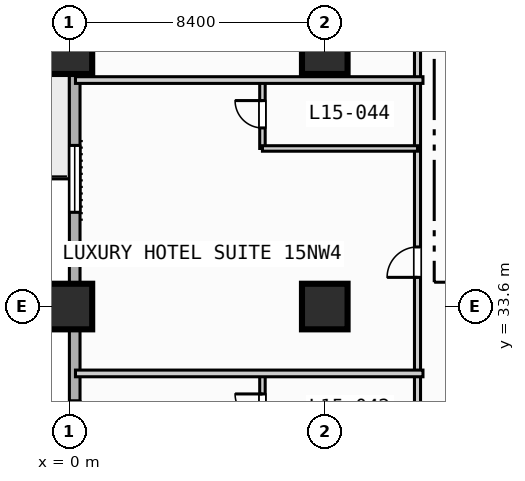
"""IFC4 building model, lengths in metres.
Left out: names, types, materials, properties, quantities, classifications, styles, units other than length and angle.
Written with IfcOpenShell. Run it as: python <this file> out.ifc"""

import sys

from ifc_helpers import new_model, si_unit, direction, frame, frame_2d, origin, origin_2d, place, context, subcontext, project, spatial, rectangle, extrude, element, fill, save


model = new_model("IFC4")
c1 = context("Model", 3, precision=1e-05, world=origin(), true_north=direction((0.0, 1.0)))
c2 = subcontext(c1, "Body", "Model", "MODEL_VIEW")
j1 = project(units=[si_unit("LENGTHUNIT", "METRE"), si_unit("PLANEANGLEUNIT", "RADIAN")], contexts=[c1])
p1 = place(None, origin())
s1 = spatial("IfcSite", under=j1, at=p1, CompositionType="ELEMENT")
p2 = place(p1, origin())
s2 = spatial("IfcBuilding", under=s1, at=p2, CompositionType="ELEMENT")
p3 = place(p2, frame((0.0, 0.0, 66.2)))
s3 = spatial("IfcBuildingStorey", under=s2, at=p3, CompositionType="ELEMENT", Elevation=66.2)
for number, where, z_axis, x_axis in (
    (1, (0.0, 33.6, 0.0), (0.0, 0.0, 1.0), (1.0, 0.0, 0.0)),
    (2, (0.0, 42.0, 0.0), (0.0, 0.0, 1.0), (1.0, 0.0, 0.0)),
    (3, (8.4, 33.6, 0.0), (0.0, 0.0, 1.0), (1.0, 0.0, 0.0)),
    (4, (8.4, 42.0, 0.0), (0.0, 0.0, 1.0), (1.0, 0.0, 0.0)),
):
    element("IfcColumn", number, at=place(p3, frame(where, z_axis=z_axis, x_axis=x_axis)), inside=s3, PredefinedType="COLUMN", context=c2, shape_type="SweptSolid", body=[
        extrude(rectangle(XDim=1.5, YDim=1.5, at=origin_2d()), origin(), (0.0, 0.0, 1.0), 3.8),
    ])
p4 = place(p3, frame((0.175, 3.175, 0.0), z_axis=(0.0, 0.0, 1.0), x_axis=(0.0, 1.0, 0.0)))
e5 = element("IfcWall", 5, at=p4, inside=s3, PredefinedType="STANDARD", context=c2, shape_type="SweptSolid", body=[
    extrude(rectangle(XDim=86.05, YDim=0.35, at=frame_2d((43.025, 0.0))), origin(), (0.0, 0.0, 1.0), 3.55),
])
p5 = place(p4, frame((42.325, 0.0, 0.0)))
e6 = element("IfcOpeningElement", 6, at=p5, cuts=e5, PredefinedType="OPENING", context=c2, shape_type="SweptSolid", body=[
    extrude(rectangle(XDim=1.4, YDim=2.2, at=frame_2d((0.7, 1.1))), frame((0.0, 0.185, 0.0), z_axis=(0.0, -1.0, 0.0), x_axis=(1.0, 0.0, 0.0)), (0.0, 0.0, 1.0), 0.37),
])
p6 = place(p4, frame((8.325, 0.0, 0.85)))
e7 = element("IfcOpeningElement", 7, at=p6, cuts=e5, PredefinedType="OPENING", context=c2, shape_type="SweptSolid", body=[
    extrude(rectangle(XDim=2.2, YDim=1.8, at=frame_2d((1.1, 0.9))), frame((0.0, 0.185, 0.0), z_axis=(0.0, -1.0, 0.0), x_axis=(1.0, 0.0, 0.0)), (0.0, 0.0, 1.0), 0.37),
])
p7 = place(p4, frame((16.725, 0.0, 0.85)))
e8 = element("IfcOpeningElement", 8, at=p7, cuts=e5, PredefinedType="OPENING", context=c2, shape_type="SweptSolid", body=[
    extrude(rectangle(XDim=2.2, YDim=1.8, at=frame_2d((1.1, 0.9))), frame((0.0, 0.185, 0.0), z_axis=(0.0, -1.0, 0.0), x_axis=(1.0, 0.0, 0.0)), (0.0, 0.0, 1.0), 0.37),
])
p8 = place(p4, frame((25.125, 0.0, 0.85)))
e9 = element("IfcOpeningElement", 9, at=p8, cuts=e5, PredefinedType="OPENING", context=c2, shape_type="SweptSolid", body=[
    extrude(rectangle(XDim=2.2, YDim=1.8, at=frame_2d((1.1, 0.9))), frame((0.0, 0.185, 0.0), z_axis=(0.0, -1.0, 0.0), x_axis=(1.0, 0.0, 0.0)), (0.0, 0.0, 1.0), 0.37),
])
p9 = place(p4, frame((33.525, 0.0, 0.85)))
e10 = element("IfcOpeningElement", 10, at=p9, cuts=e5, PredefinedType="OPENING", context=c2, shape_type="SweptSolid", body=[
    extrude(rectangle(XDim=2.2, YDim=1.8, at=frame_2d((1.1, 0.9))), frame((0.0, 0.185, 0.0), z_axis=(0.0, -1.0, 0.0), x_axis=(1.0, 0.0, 0.0)), (0.0, 0.0, 1.0), 0.37),
])
p10 = place(p4, frame((2.375, 0.0, 0.85)))
e11 = element("IfcOpeningElement", 11, at=p10, cuts=e5, PredefinedType="OPENING", context=c2, shape_type="SweptSolid", body=[
    extrude(rectangle(XDim=1.8, YDim=1.8, at=frame_2d((0.9, 0.9))), frame((0.0, 0.185, 0.0), z_axis=(0.0, -1.0, 0.0), x_axis=(1.0, 0.0, 0.0)), (0.0, 0.0, 1.0), 0.37),
])
p11 = place(p4, frame((56.475, 0.0, 0.85)))
e12 = element("IfcOpeningElement", 12, at=p11, cuts=e5, PredefinedType="OPENING", context=c2, shape_type="SweptSolid", body=[
    extrude(rectangle(XDim=1.8, YDim=1.8, at=frame_2d((0.9, 0.9))), frame((0.0, 0.185, 0.0), z_axis=(0.0, -1.0, 0.0), x_axis=(1.0, 0.0, 0.0)), (0.0, 0.0, 1.0), 0.37),
])
p12 = place(p3, frame((11.45, 3.4, 0.0), z_axis=(0.0, 0.0, 1.0), x_axis=(0.0, 1.0, 0.0)))
e13 = element("IfcWall", 13, at=p12, inside=s3, PredefinedType="PARTITIONING", context=c2, shape_type="SweptSolid", body=[
    extrude(rectangle(XDim=60.4, YDim=0.2, at=frame_2d((30.2, 0.0))), origin(), (0.0, 0.0, 1.0), 3.55),
])
p13 = place(p12, frame((4.465, 0.0, 0.0)))
e14 = element("IfcOpeningElement", 14, at=p13, cuts=e13, PredefinedType="OPENING", context=c2, shape_type="SweptSolid", body=[
    extrude(rectangle(XDim=1.0, YDim=2.15, at=frame_2d((0.5, 1.075))), frame((0.0, 0.11, 0.0), z_axis=(0.0, -1.0, 0.0), x_axis=(1.0, 0.0, 0.0)), (0.0, 0.0, 1.0), 0.22),
])
p14 = place(p12, frame((14.665, 0.0, 0.0)))
e15 = element("IfcOpeningElement", 15, at=p14, cuts=e13, PredefinedType="OPENING", context=c2, shape_type="SweptSolid", body=[
    extrude(rectangle(XDim=1.0, YDim=2.15, at=frame_2d((0.5, 1.075))), frame((0.0, 0.11, 0.0), z_axis=(0.0, -1.0, 0.0), x_axis=(1.0, 0.0, 0.0)), (0.0, 0.0, 1.0), 0.22),
])
p15 = place(p12, frame((22.535, 0.0, 0.0)))
e16 = element("IfcOpeningElement", 16, at=p15, cuts=e13, PredefinedType="OPENING", context=c2, shape_type="SweptSolid", body=[
    extrude(rectangle(XDim=1.0, YDim=2.15, at=frame_2d((0.5, 1.075))), frame((0.0, 0.11, 0.0), z_axis=(0.0, -1.0, 0.0), x_axis=(1.0, 0.0, 0.0)), (0.0, 0.0, 1.0), 0.22),
])
p16 = place(p12, frame((31.16, 0.0, 0.0)))
e17 = element("IfcOpeningElement", 17, at=p16, cuts=e13, PredefinedType="OPENING", context=c2, shape_type="SweptSolid", body=[
    extrude(rectangle(XDim=1.0, YDim=2.15, at=frame_2d((0.5, 1.075))), frame((0.0, 0.11, 0.0), z_axis=(0.0, -1.0, 0.0), x_axis=(1.0, 0.0, 0.0)), (0.0, 0.0, 1.0), 0.22),
])
p17 = place(p12, frame((42.36, 0.0, 0.0)))
e18 = element("IfcOpeningElement", 18, at=p17, cuts=e13, PredefinedType="OPENING", context=c2, shape_type="SweptSolid", body=[
    extrude(rectangle(XDim=1.0, YDim=2.15, at=frame_2d((0.5, 1.075))), frame((0.0, 0.11, 0.0), z_axis=(0.0, -1.0, 0.0), x_axis=(1.0, 0.0, 0.0)), (0.0, 0.0, 1.0), 0.22),
])
p18 = place(p12, frame((56.065, 0.0, 0.0)))
e19 = element("IfcOpeningElement", 19, at=p18, cuts=e13, PredefinedType="OPENING", context=c2, shape_type="SweptSolid", body=[
    extrude(rectangle(XDim=1.0, YDim=2.15, at=frame_2d((0.5, 1.075))), frame((0.0, 0.11, 0.0), z_axis=(0.0, -1.0, 0.0), x_axis=(1.0, 0.0, 0.0)), (0.0, 0.0, 1.0), 0.22),
])
p19 = place(p3, frame((6.35, 29.15, 0.0), z_axis=(0.0, 0.0, 1.0), x_axis=(0.0, 1.0, 0.0)))
e20 = element("IfcWall", 20, at=p19, inside=s3, PredefinedType="PLUMBINGWALL", context=c2, shape_type="SweptSolid", body=[
    extrude(rectangle(XDim=2.25, YDim=0.18, at=frame_2d((1.125, 0.0))), origin(), (0.0, 0.0, 1.0), 3.55),
])
p20 = place(p19, frame((0.675, 0.0, 0.0)))
e21 = element("IfcOpeningElement", 21, at=p20, cuts=e20, PredefinedType="OPENING", context=c2, shape_type="SweptSolid", body=[
    extrude(rectangle(XDim=0.9, YDim=2.1, at=frame_2d((0.45, 1.05))), frame((0.0, 0.1, 0.0), z_axis=(0.0, -1.0, 0.0), x_axis=(1.0, 0.0, 0.0)), (0.0, 0.0, 1.0), 0.2),
])
p21 = place(p3, frame((0.2, 31.4, 0.0), z_axis=(0.0, 0.0, 1.0), x_axis=(1.0, 0.0, 0.0)))
e22 = element("IfcWall", 22, at=p21, inside=s3, PredefinedType="PARTITIONING", context=c2, shape_type="SweptSolid", body=[
    extrude(rectangle(XDim=11.43, YDim=0.22, at=frame_2d((5.715, 0.0))), origin(), (0.0, 0.0, 1.0), 3.55),
])
p22 = place(p3, frame((6.35, 38.8, 0.0), z_axis=(0.0, 0.0, 1.0), x_axis=(0.0, 1.0, 0.0)))
e23 = element("IfcWall", 23, at=p22, inside=s3, PredefinedType="PLUMBINGWALL", context=c2, shape_type="SweptSolid", body=[
    extrude(rectangle(XDim=2.25, YDim=0.18, at=frame_2d((1.125, 0.0))), origin(), (0.0, 0.0, 1.0), 3.55),
])
p23 = place(p22, frame((0.675, 0.0, 0.0)))
e24 = element("IfcOpeningElement", 24, at=p23, cuts=e23, PredefinedType="OPENING", context=c2, shape_type="SweptSolid", body=[
    extrude(rectangle(XDim=0.9, YDim=2.1, at=frame_2d((0.45, 1.05))), frame((0.0, 0.1, 0.0), z_axis=(0.0, -1.0, 0.0), x_axis=(1.0, 0.0, 0.0)), (0.0, 0.0, 1.0), 0.2),
])
p24 = place(p3, frame((6.35, 38.8, 0.0), z_axis=(0.0, 0.0, 1.0), x_axis=(1.0, 0.0, 0.0)))
e25 = element("IfcWall", 25, at=p24, inside=s3, PredefinedType="PLUMBINGWALL", context=c2, shape_type="SweptSolid", body=[
    extrude(rectangle(XDim=5.1, YDim=0.18, at=frame_2d((2.55, 0.0))), origin(), (0.0, 0.0, 1.0), 3.55),
])
p25 = place(p3, frame((0.2, 41.05, 0.0), z_axis=(0.0, 0.0, 1.0), x_axis=(1.0, 0.0, 0.0)))
e26 = element("IfcWall", 26, at=p25, inside=s3, PredefinedType="PARTITIONING", context=c2, shape_type="SweptSolid", body=[
    extrude(rectangle(XDim=11.43, YDim=0.22, at=frame_2d((5.715, 0.0))), origin(), (0.0, 0.0, 1.0), 3.55),
])
p26 = place(p8, origin())
e27 = element("IfcWindow", 27, at=p26, inside=s3, PartitioningType="SINGLE_PANEL", PredefinedType="WINDOW", context=c2, shape_type="SweptSolid", body=[
    extrude(rectangle(XDim=2.2, YDim=1.8, at=frame_2d((1.1, 0.9))), frame((0.0, 0.03, 0.0), z_axis=(0.0, -1.0, 0.0), x_axis=(1.0, 0.0, 0.0)), (0.0, 0.0, 1.0), 0.06),
])
fill(e9, e27)
p27 = place(p9, origin())
e28 = element("IfcWindow", 28, at=p27, inside=s3, PartitioningType="SINGLE_PANEL", PredefinedType="WINDOW", context=c2, shape_type="SweptSolid", body=[
    extrude(rectangle(XDim=2.2, YDim=1.8, at=frame_2d((1.1, 0.9))), frame((0.0, 0.03, 0.0), z_axis=(0.0, -1.0, 0.0), x_axis=(1.0, 0.0, 0.0)), (0.0, 0.0, 1.0), 0.06),
])
fill(e10, e28)
p28 = place(p16, origin())
e29 = element("IfcDoor", 29, at=p28, inside=s3, OperationType="SINGLE_SWING_LEFT", PredefinedType="DOOR", context=c2, shape_type="SweptSolid", body=[
    extrude(rectangle(XDim=1.0, YDim=2.15, at=frame_2d((0.5, 1.075))), frame((0.0, 0.025, 0.0), z_axis=(0.0, -1.0, 0.0), x_axis=(1.0, 0.0, 0.0)), (0.0, 0.0, 1.0), 0.05),
])
fill(e17, e29)
p29 = place(p20, origin())
e30 = element("IfcDoor", 30, at=p29, inside=s3, OperationType="SINGLE_SWING_RIGHT", PredefinedType="DOOR", context=c2, shape_type="SweptSolid", body=[
    extrude(rectangle(XDim=0.9, YDim=2.1, at=frame_2d((0.45, 1.05))), frame((0.0, 0.025, 0.0), z_axis=(0.0, -1.0, 0.0), x_axis=(1.0, 0.0, 0.0)), (0.0, 0.0, 1.0), 0.05),
])
fill(e21, e30)
p30 = place(p23, origin())
e31 = element("IfcDoor", 31, at=p30, inside=s3, OperationType="SINGLE_SWING_RIGHT", PredefinedType="DOOR", context=c2, shape_type="SweptSolid", body=[
    extrude(rectangle(XDim=0.9, YDim=2.1, at=frame_2d((0.45, 1.05))), frame((0.0, 0.025, 0.0), z_axis=(0.0, -1.0, 0.0), x_axis=(1.0, 0.0, 0.0)), (0.0, 0.0, 1.0), 0.05),
])
fill(e24, e31)
save(model, sys.argv[1])
